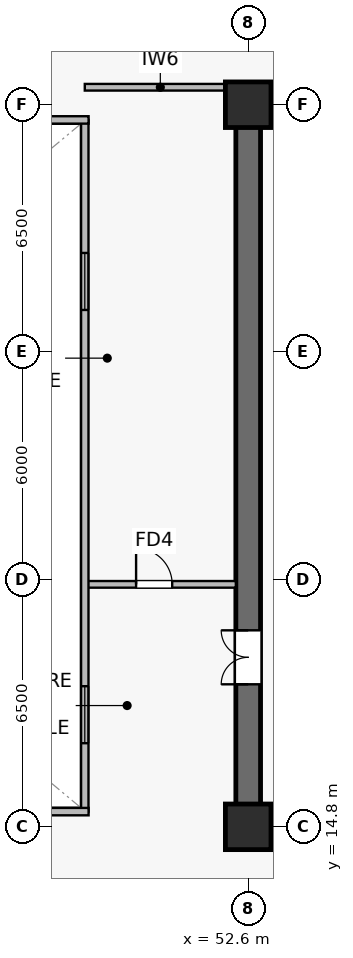
"""IFC4 building model, lengths in metres.
Left out: names, types, materials, properties, quantities, classifications, styles, units other than length and angle.
Written with IfcOpenShell. Run it as: python <this file> out.ifc"""

import sys

from ifc_helpers import new_model, si_unit, direction, frame, frame_2d, origin, origin_2d, place, context, subcontext, project, spatial, rectangle, extrude, source, transform, mapped, element, fill, save


model = new_model("IFC4")
c1 = context("Model", 3, precision=1e-05, world=origin(), true_north=direction((0.0, 1.0)))
c2 = subcontext(c1, "Body", "Model", "MODEL_VIEW")
j1 = project(units=[si_unit("LENGTHUNIT", "METRE"), si_unit("PLANEANGLEUNIT", "RADIAN")], contexts=[c1])
p1 = place(None, origin())
s1 = spatial("IfcSite", under=j1, at=p1, CompositionType="ELEMENT")
p2 = place(p1, origin())
s2 = spatial("IfcBuilding", under=s1, at=p2, CompositionType="ELEMENT")
p3 = place(p2, frame((0.0, 0.0, 125.6)))
s3 = spatial("IfcBuildingStorey", under=s2, at=p3, CompositionType="ELEMENT", Elevation=125.6)
p4 = place(p3, frame((52.275, 14.8, 0.0), z_axis=(0.0, 0.0, 1.0), x_axis=(1.0, 0.0, 0.0)))
e1 = element("IfcWall", 1, at=p4, inside=s3, PredefinedType="SHEAR", context=c2, shape_type="SweptSolid", body=[
    extrude(rectangle(XDim=15.45, YDim=0.65, at=frame_2d((7.725, 0.0))), origin(), (0.0, 0.0, 1.0), 3.79),
])
p5 = place(p3, frame((52.275, 33.8, 0.0), z_axis=(0.0, 0.0, 1.0), x_axis=(1.0, 0.0, 0.0)))
e2 = element("IfcWall", 2, at=p5, inside=s3, PredefinedType="SHEAR", context=c2, shape_type="SweptSolid", body=[
    extrude(rectangle(XDim=15.45, YDim=0.65, at=frame_2d((7.725, 0.0))), origin(), (0.0, 0.0, 1.0), 3.79),
])
p6 = place(p5, frame((6.125, 0.0, 0.0)))
e3 = element("IfcOpeningElement", 3, at=p6, cuts=e2, PredefinedType="OPENING", context=c2, shape_type="SweptSolid", body=[
    extrude(rectangle(XDim=0.95, YDim=2.15, at=frame_2d((0.475, 1.075))), frame((0.0, 0.335, 0.0), z_axis=(0.0, -1.0, 0.0), x_axis=(1.0, 0.0, 0.0)), (0.0, 0.0, 1.0), 0.67),
])
p7 = place(p5, frame((2.585, 0.0, 0.0)))
e4 = element("IfcOpeningElement", 4, at=p7, cuts=e2, PredefinedType="OPENING", context=c2, shape_type="SweptSolid", body=[
    extrude(rectangle(XDim=0.95, YDim=2.15, at=frame_2d((0.475, 1.075))), frame((0.0, 0.335, 0.0), z_axis=(0.0, -1.0, 0.0), x_axis=(1.0, 0.0, 0.0)), (0.0, 0.0, 1.0), 0.67),
])
p8 = place(p3, frame((52.6, 15.125, 0.0), z_axis=(0.0, 0.0, 1.0), x_axis=(0.0, 1.0, 0.0)))
e5 = element("IfcWall", 5, at=p8, inside=s3, PredefinedType="SHEAR", context=c2, shape_type="SweptSolid", body=[
    extrude(rectangle(XDim=18.35, YDim=0.65, at=frame_2d((9.175, 0.0))), origin(), (0.0, 0.0, 1.0), 3.79),
])
p9 = place(p8, frame((3.425, 0.0, 0.0)))
e6 = element("IfcOpeningElement", 6, at=p9, cuts=e5, PredefinedType="OPENING", context=c2, shape_type="SweptSolid", body=[
    extrude(rectangle(XDim=1.42, YDim=2.2, at=frame_2d((0.71, 1.1))), frame((0.0, 0.335, 0.0), z_axis=(0.0, -1.0, 0.0), x_axis=(1.0, 0.0, 0.0)), (0.0, 0.0, 1.0), 0.67),
])
m1 = source(origin(), c2, "Body", "SweptSolid", [
    extrude(rectangle(XDim=1.2, YDim=1.2, at=origin_2d()), origin(), (0.0, 0.0, 1.0), 4.1),
])
for number, where, z_axis, x_axis in (
    (7, (52.6, 14.8, 0.0), (0.0, 0.0, 1.0), (1.0, 0.0, 0.0)),
    (8, (52.6, 33.8, 0.0), (0.0, 0.0, 1.0), (1.0, 0.0, 0.0)),
):
    element("IfcColumn", number, at=place(p3, frame(where, z_axis=z_axis, x_axis=x_axis)), inside=s3, PredefinedType="COLUMN", context=c2, shape_type="MappedRepresentation", body=[
        mapped(m1, transform((0.0, 0.0, 0.0), scale=1.0)),
    ])
p10 = place(p3, frame((48.3, 34.26, 0.0), z_axis=(0.0, 0.0, 1.0), x_axis=(1.0, 0.0, 0.0)))
e9 = element("IfcWall", 9, at=p10, inside=s3, PredefinedType="PARTITIONING", context=c2, shape_type="SweptSolid", body=[
    extrude(rectangle(XDim=3.975, YDim=0.175, at=frame_2d((1.987, 0.0))), origin(), (0.0, 0.0, 1.0), 3.475),
])
p11 = place(p3, frame((48.3, 21.18, 0.0), z_axis=(0.0, 0.0, 1.0), x_axis=(1.0, 0.0, 0.0)))
e10 = element("IfcWall", 10, at=p11, inside=s3, PredefinedType="PARTITIONING", context=c2, shape_type="SweptSolid", body=[
    extrude(rectangle(XDim=3.975, YDim=0.175, at=frame_2d((1.987, 0.0))), origin(), (0.0, 0.0, 1.0), 3.79),
])
p12 = place(p11, frame((1.35, 0.0, 0.0)))
e11 = element("IfcOpeningElement", 11, at=p12, cuts=e10, PredefinedType="OPENING", context=c2, shape_type="SweptSolid", body=[
    extrude(rectangle(XDim=0.95, YDim=2.15, at=frame_2d((0.475, 1.075))), frame((0.0, 0.098, 0.0), z_axis=(0.0, -1.0, 0.0), x_axis=(1.0, 0.0, 0.0)), (0.0, 0.0, 1.0), 0.195),
])
p13 = place(p3, frame((48.3, 15.2, 0.0), z_axis=(0.0, 0.0, 1.0), x_axis=(0.0, 1.0, 0.0)))
e12 = element("IfcWall", 12, at=p13, inside=s3, PredefinedType="SOLIDWALL", context=c2, shape_type="SweptSolid", body=[
    extrude(rectangle(XDim=18.2, YDim=0.195, at=frame_2d((9.1, 0.0))), origin(), (0.0, 0.0, 1.0), 3.79),
])
p14 = place(p13, frame((1.8, 0.0, 0.9)))
e13 = element("IfcOpeningElement", 13, at=p14, cuts=e12, PredefinedType="OPENING", context=c2, shape_type="SweptSolid", body=[
    extrude(rectangle(XDim=1.5, YDim=1.4, at=frame_2d((0.75, 0.7))), frame((0.0, 0.107, 0.0), z_axis=(0.0, -1.0, 0.0), x_axis=(1.0, 0.0, 0.0)), (0.0, 0.0, 1.0), 0.215),
])
p15 = place(p13, frame((13.2, 0.0, 0.9)))
e14 = element("IfcOpeningElement", 14, at=p15, cuts=e12, PredefinedType="OPENING", context=c2, shape_type="SweptSolid", body=[
    extrude(rectangle(XDim=1.5, YDim=1.4, at=frame_2d((0.75, 0.7))), frame((0.0, 0.107, 0.0), z_axis=(0.0, -1.0, 0.0), x_axis=(1.0, 0.0, 0.0)), (0.0, 0.0, 1.0), 0.215),
])
for number, where, z_axis, x_axis in (
    (15, (26.4, 15.2, 0.0), (0.0, 0.0, 1.0), (1.0, 0.0, 0.0)),
    (16, (26.4, 33.4, 0.0), (0.0, 0.0, 1.0), (1.0, 0.0, 0.0)),
):
    element("IfcWall", number, at=place(p3, frame(where, z_axis=z_axis, x_axis=x_axis)), inside=s3, PredefinedType="SOLIDWALL", context=c2, shape_type="SweptSolid", body=[
        extrude(rectangle(XDim=22.0, YDim=0.195, at=frame_2d((11.0, 0.0))), origin(), (0.0, 0.0, 1.0), 3.79),
    ])
m2 = source(origin(), c2, "Body", "SweptSolid", [
    extrude(rectangle(XDim=1.5, YDim=1.4, at=frame_2d((0.75, 0.7))), frame((0.0, 0.03, 0.0), z_axis=(0.0, -1.0, 0.0), x_axis=(1.0, 0.0, 0.0)), (0.0, 0.0, 1.0), 0.06),
])
p16 = place(p14, origin())
e17 = element("IfcWindow", 17, at=p16, inside=s3, PartitioningType="SINGLE_PANEL", PredefinedType="WINDOW", context=c2, shape_type="MappedRepresentation", body=[
    mapped(m2, transform((0.0, 0.0, 0.0), scale=1.0)),
])
fill(e13, e17)
p17 = place(p15, origin())
e18 = element("IfcWindow", 18, at=p17, inside=s3, PartitioningType="SINGLE_PANEL", PredefinedType="WINDOW", context=c2, shape_type="MappedRepresentation", body=[
    mapped(m2, transform((0.0, 0.0, 0.0), scale=1.0)),
])
fill(e14, e18)
m3 = source(origin(), c2, "Body", "SweptSolid", [
    extrude(rectangle(XDim=1.42, YDim=2.2, at=frame_2d((0.71, 1.1))), frame((0.0, 0.025, 0.0), z_axis=(0.0, -1.0, 0.0), x_axis=(1.0, 0.0, 0.0)), (0.0, 0.0, 1.0), 0.05),
])
p18 = place(p9, origin())
e19 = element("IfcDoor", 19, at=p18, inside=s3, OperationType="DOUBLE_DOOR_SINGLE_SWING", PredefinedType="DOOR", context=c2, shape_type="MappedRepresentation", body=[
    mapped(m3, transform((0.0, 0.0, 0.0), scale=1.0)),
])
fill(e6, e19)
m4 = source(origin(), c2, "Body", "SweptSolid", [
    extrude(rectangle(XDim=0.95, YDim=2.15, at=frame_2d((0.475, 1.075))), frame((0.0, 0.025, 0.0), z_axis=(0.0, -1.0, 0.0), x_axis=(1.0, 0.0, 0.0)), (0.0, 0.0, 1.0), 0.05),
])
p19 = place(p12, origin())
e20 = element("IfcDoor", 20, at=p19, inside=s3, OperationType="SINGLE_SWING_LEFT", PredefinedType="DOOR", context=c2, shape_type="MappedRepresentation", body=[
    mapped(m4, transform((0.0, 0.0, 0.0), scale=1.0)),
])
fill(e11, e20)
save(model, sys.argv[1])
